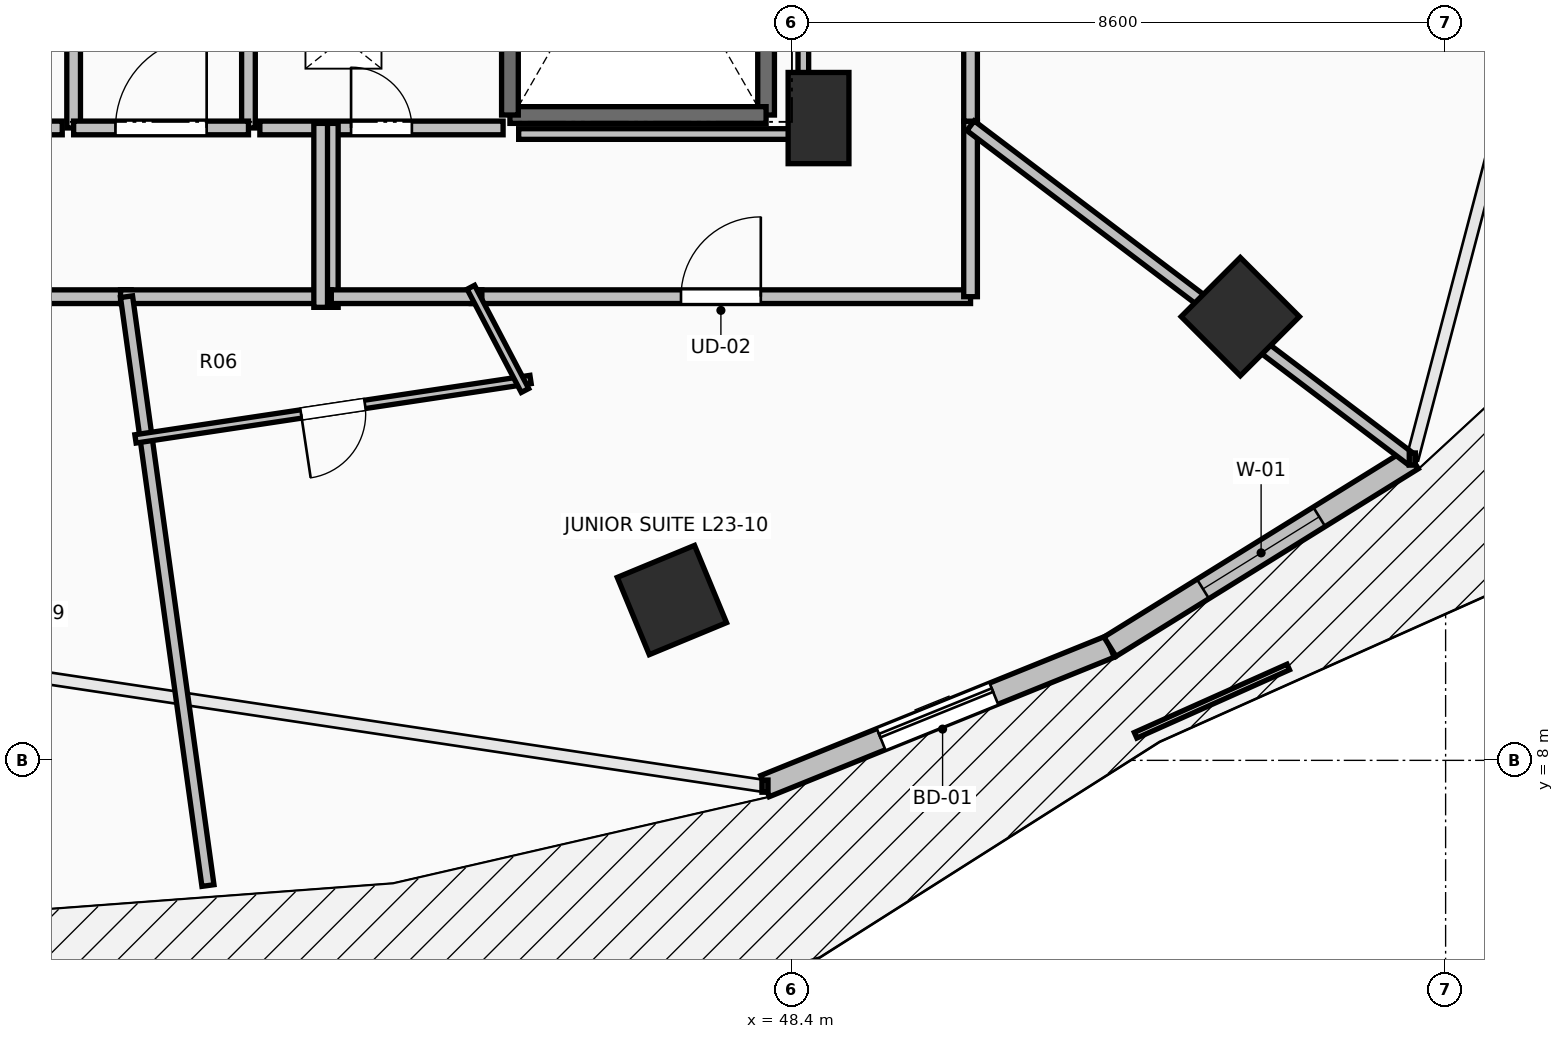
"""IFC4 building model, lengths in metres.
Left out: names, types, materials, properties, quantities, classifications, styles, units other than length and angle.
Written with IfcOpenShell. Run it as: python <this file> out.ifc"""

import sys

from ifc_helpers import new_model, si_unit, direction, frame, frame_2d, origin, origin_2d, place, context, subcontext, project, spatial, rectangle, extrude, element, fill, save


model = new_model("IFC4")
c1 = context("Model", 3, precision=1e-05, world=origin(), true_north=direction((0.0, 1.0)))
c2 = subcontext(c1, "Body", "Model", "MODEL_VIEW")
j1 = project(units=[si_unit("LENGTHUNIT", "METRE"), si_unit("PLANEANGLEUNIT", "RADIAN")], contexts=[c1])
p1 = place(None, origin())
s1 = spatial("IfcSite", under=j1, at=p1, CompositionType="ELEMENT")
p2 = place(p1, origin())
s2 = spatial("IfcBuilding", under=s1, at=p2, CompositionType="ELEMENT")
p3 = place(p2, frame((0.0, 0.0, 89.3)))
s3 = spatial("IfcBuildingStorey", under=s2, at=p3, CompositionType="ELEMENT", Elevation=89.3)
for number, where, z_axis, x_axis in (
    (1, (46.821, 10.109, 0.0), (0.0, 0.0, 1.0), (0.383, -0.924, 0.0)),
    (2, (54.299, 13.838, 0.0), (0.0, 0.0, 1.0), (0.707, -0.707, 0.0)),
):
    element("IfcColumn", number, at=place(p3, frame(where, z_axis=z_axis, x_axis=x_axis)), inside=s3, PredefinedType="COLUMN", context=c2, shape_type="SweptSolid", body=[
        extrude(rectangle(XDim=1.1, YDim=1.1, at=origin_2d()), origin(), (0.0, 0.0, 1.0), 3.5),
    ])
p4 = place(p3, frame((48.75, 16.45, 0.0), z_axis=(0.0, 0.0, 1.0), x_axis=(1.0, 0.0, 0.0)))
e3 = element("IfcColumn", 3, at=p4, inside=s3, PredefinedType="PILASTER", context=c2, shape_type="SweptSolid", body=[
    extrude(rectangle(XDim=0.8, YDim=1.2, at=origin_2d()), origin(), (0.0, 0.0, 1.0), 3.5),
])
p5 = place(p3, frame((48.045, 7.661, 0.0), z_axis=(0.0, 0.0, 1.0), x_axis=(0.927122233109, 0.374759075775, 0.0)))
e4 = element("IfcWall", 4, at=p5, inside=s3, PredefinedType="STANDARD", context=c2, shape_type="SweptSolid", body=[
    extrude(rectangle(XDim=4.895, YDim=0.3, at=frame_2d((2.448, 0.0))), origin(), (0.0, 0.0, 1.0), 3.24),
])
p6 = place(p5, frame((1.647, 0.0, 0.0)))
e5 = element("IfcOpeningElement", 5, at=p6, cuts=e4, PredefinedType="OPENING", context=c2, shape_type="SweptSolid", body=[
    extrude(rectangle(XDim=1.6, YDim=2.3, at=frame_2d((0.8, 1.15))), frame((0.0, 0.165, 0.0), z_axis=(0.0, -1.0, 0.0), x_axis=(1.0, 0.0, 0.0)), (0.0, 0.0, 1.0), 0.33),
])
p7 = place(p3, frame((52.584, 9.495, 0.0), z_axis=(0.0, 0.0, 1.0), x_axis=(0.849684479743, 0.527291461038, 0.0)))
e6 = element("IfcWall", 6, at=p7, inside=s3, PredefinedType="STANDARD", context=c2, shape_type="SweptSolid", body=[
    extrude(rectangle(XDim=4.681, YDim=0.3, at=frame_2d((2.341, 0.0))), origin(), (0.0, 0.0, 1.0), 3.24),
])
p8 = place(p7, frame((1.441, 0.0, 0.85)))
e7 = element("IfcOpeningElement", 7, at=p8, cuts=e6, PredefinedType="OPENING", context=c2, shape_type="SweptSolid", body=[
    extrude(rectangle(XDim=1.8, YDim=2.19, at=frame_2d((0.9, 1.095))), frame((0.0, 0.165, 0.0), z_axis=(0.0, -1.0, 0.0), x_axis=(1.0, 0.0, 0.0)), (0.0, 0.0, 1.0), 0.33),
])
p9 = place(p3, frame((48.06, 23.91, 0.0), z_axis=(0.0, 0.0, 1.0), x_axis=(0.0, -1.0, 0.0)))
e8 = element("IfcWall", 8, at=p9, inside=s3, PredefinedType="SOLIDWALL", context=c2, shape_type="SweptSolid", body=[
    extrude(rectangle(XDim=7.42, YDim=0.22, at=frame_2d((3.71, 0.0))), origin(), (0.0, 0.0, 1.0), 3.24),
])
p10 = place(p3, frame((48.06, 16.49, 0.0), z_axis=(0.0, 0.0, 1.0), x_axis=(-1.0, 0.0, 0.0)))
e9 = element("IfcWall", 9, at=p10, inside=s3, PredefinedType="SOLIDWALL", context=c2, shape_type="SweptSolid", body=[
    extrude(rectangle(XDim=3.37, YDim=0.22, at=frame_2d((1.685, 0.0))), origin(), (0.0, 0.0, 1.0), 3.24),
])
p11 = place(p3, frame((44.69, 16.49, 0.0), z_axis=(0.0, 0.0, 1.0), x_axis=(0.0, 1.0, 0.0)))
e10 = element("IfcWall", 10, at=p11, inside=s3, PredefinedType="SOLIDWALL", context=c2, shape_type="SweptSolid", body=[
    extrude(rectangle(XDim=7.42, YDim=0.22, at=frame_2d((3.71, 0.0))), origin(), (0.0, 0.0, 1.0), 3.24),
])
p12 = place(p3, frame((41.25, 16.32, 0.0), z_axis=(0.0, 0.0, 1.0), x_axis=(0.0, 1.0, 0.0)))
e11 = element("IfcWall", 11, at=p12, inside=s3, PredefinedType="PARTITIONING", context=c2, shape_type="SweptSolid", body=[
    extrude(rectangle(XDim=7.88, YDim=0.18, at=frame_2d((3.94, 0.0))), origin(), (0.0, 0.0, 1.0), 3.24),
])
p13 = place(p12, frame((3.54, 0.0, 0.0)))
e12 = element("IfcOpeningElement", 12, at=p13, cuts=e11, PredefinedType="OPENING", context=c2, shape_type="SweptSolid", body=[
    extrude(rectangle(XDim=0.8, YDim=2.05, at=frame_2d((0.4, 1.025))), frame((0.0, 0.105, 0.0), z_axis=(0.0, -1.0, 0.0), x_axis=(1.0, 0.0, 0.0)), (0.0, 0.0, 1.0), 0.21),
])
p14 = place(p3, frame((38.95, 21.755, 0.0), z_axis=(0.0, 0.0, 1.0), x_axis=(0.0, -1.0, 0.0)))
e13 = element("IfcWall", 13, at=p14, inside=s3, PredefinedType="PARTITIONING", context=c2, shape_type="SweptSolid", body=[
    extrude(rectangle(XDim=5.435, YDim=0.18, at=frame_2d((2.717, 0.0))), origin(), (0.0, 0.0, 1.0), 3.24),
])
p15 = place(p14, frame((2.292, 0.0, 0.0)))
e14 = element("IfcOpeningElement", 14, at=p15, cuts=e13, PredefinedType="OPENING", context=c2, shape_type="SweptSolid", body=[
    extrude(rectangle(XDim=0.85, YDim=2.1, at=frame_2d((0.425, 1.05))), frame((0.0, 0.105, 0.0), z_axis=(0.0, -1.0, 0.0), x_axis=(1.0, 0.0, 0.0)), (0.0, 0.0, 1.0), 0.21),
])
p16 = place(p3, frame((38.95, 16.32, 0.0), z_axis=(0.0, 0.0, 1.0), x_axis=(1.0, 0.0, 0.0)))
e15 = element("IfcWall", 15, at=p16, inside=s3, PredefinedType="PARTITIONING", context=c2, shape_type="SweptSolid", body=[
    extrude(rectangle(XDim=2.3, YDim=0.18, at=frame_2d((1.15, 0.0))), origin(), (0.0, 0.0, 1.0), 3.24),
])
p17 = place(p16, frame((0.55, 0.0, 0.0)))
e16 = element("IfcOpeningElement", 16, at=p17, cuts=e15, PredefinedType="OPENING", context=c2, shape_type="SweptSolid", body=[
    extrude(rectangle(XDim=1.2, YDim=2.15, at=frame_2d((0.6, 1.075))), frame((0.0, 0.105, 0.0), z_axis=(0.0, -1.0, 0.0), x_axis=(1.0, 0.0, 0.0)), (0.0, 0.0, 1.0), 0.21),
])
p18 = place(p3, frame((41.4, 16.32, 0.0), z_axis=(0.0, 0.0, 1.0), x_axis=(1.0, 0.0, 0.0)))
e17 = element("IfcWall", 17, at=p18, inside=s3, PredefinedType="PARTITIONING", context=c2, shape_type="SweptSolid", body=[
    extrude(rectangle(XDim=3.2, YDim=0.18, at=frame_2d((1.6, 0.0))), origin(), (0.0, 0.0, 1.0), 3.24),
])
p19 = place(p18, frame((1.2, 0.0, 0.0)))
e18 = element("IfcOpeningElement", 18, at=p19, cuts=e17, PredefinedType="OPENING", context=c2, shape_type="SweptSolid", body=[
    extrude(rectangle(XDim=0.8, YDim=2.05, at=frame_2d((0.4, 1.025))), frame((0.0, 0.105, 0.0), z_axis=(0.0, -1.0, 0.0), x_axis=(1.0, 0.0, 0.0)), (0.0, 0.0, 1.0), 0.21),
])
p20 = place(p3, frame((35.2, 16.32, 0.0), z_axis=(0.0, 0.0, 1.0), x_axis=(1.0, 0.0, 0.0)))
e19 = element("IfcWall", 19, at=p20, inside=s3, PredefinedType="PARTITIONING", context=c2, shape_type="SweptSolid", body=[
    extrude(rectangle(XDim=3.6, YDim=0.18, at=frame_2d((1.8, 0.0))), origin(), (0.0, 0.0, 1.0), 3.24),
])
p21 = place(p20, frame((1.375, 0.0, 0.0)))
e20 = element("IfcOpeningElement", 20, at=p21, cuts=e19, PredefinedType="OPENING", context=c2, shape_type="SweptSolid", body=[
    extrude(rectangle(XDim=0.85, YDim=2.1, at=frame_2d((0.425, 1.05))), frame((0.0, 0.105, 0.0), z_axis=(0.0, -1.0, 0.0), x_axis=(1.0, 0.0, 0.0)), (0.0, 0.0, 1.0), 0.21),
])
p22 = place(p3, frame((36.068, 14.1, 0.0), z_axis=(0.0, 0.0, 1.0), x_axis=(1.0, 0.0, 0.0)))
e21 = element("IfcWall", 21, at=p22, inside=s3, PredefinedType="PARTITIONING", context=c2, shape_type="SweptSolid", body=[
    extrude(rectangle(XDim=3.639, YDim=0.18, at=frame_2d((1.819, 0.0))), origin(), (0.0, 0.0, 1.0), 2.972),
])
p23 = place(p22, frame((1.32, 0.0, 0.0)))
e22 = element("IfcOpeningElement", 22, at=p23, cuts=e21, PredefinedType="OPENING", context=c2, shape_type="SweptSolid", body=[
    extrude(rectangle(XDim=1.0, YDim=2.15, at=frame_2d((0.5, 1.075))), frame((0.0, 0.105, 0.0), z_axis=(0.0, -1.0, 0.0), x_axis=(1.0, 0.0, 0.0)), (0.0, 0.0, 1.0), 0.21),
])
p24 = place(p3, frame((44.181, 14.1, 0.0), z_axis=(0.0, 0.0, 1.0), x_axis=(1.0, 0.0, 0.0)))
e23 = element("IfcWall", 23, at=p24, inside=s3, PredefinedType="PARTITIONING", context=c2, shape_type="SweptSolid", body=[
    extrude(rectangle(XDim=6.569, YDim=0.18, at=frame_2d((3.285, 0.0))), origin(), (0.0, 0.0, 1.0), 2.432),
])
p25 = place(p24, frame((2.76, 0.0, 0.0)))
e24 = element("IfcOpeningElement", 24, at=p25, cuts=e23, PredefinedType="OPENING", context=c2, shape_type="SweptSolid", body=[
    extrude(rectangle(XDim=1.05, YDim=2.2, at=frame_2d((0.525, 1.1))), frame((0.0, 0.105, 0.0), z_axis=(0.0, -1.0, 0.0), x_axis=(1.0, 0.0, 0.0)), (0.0, 0.0, 1.0), 0.21),
])
p26 = place(p3, frame((50.75, 14.1, 0.0), z_axis=(0.0, 0.0, 1.0), x_axis=(0.0, 1.0, 0.0)))
e25 = element("IfcWall", 25, at=p26, inside=s3, PredefinedType="PARTITIONING", context=c2, shape_type="SweptSolid", body=[
    extrude(rectangle(XDim=2.309, YDim=0.18, at=frame_2d((1.154, 0.0))), origin(), (0.0, 0.0, 1.0), 2.432),
])
p27 = place(p3, frame((42.34, 16.38, 0.0), z_axis=(0.0, 0.0, 1.0), x_axis=(0.0, -1.0, 0.0)))
e26 = element("IfcWall", 26, at=p27, inside=s3, PredefinedType="PARTITIONING", context=c2, shape_type="SweptSolid", body=[
    extrude(rectangle(XDim=2.42, YDim=0.18, at=frame_2d((1.21, 0.0))), origin(), (0.0, 0.0, 1.0), 2.972),
])
p28 = place(p3, frame((42.2, 14.1, 0.0), z_axis=(0.0, 0.0, 1.0), x_axis=(1.0, 0.0, 0.0)))
e27 = element("IfcWall", 27, at=p28, inside=s3, PredefinedType="PARTITIONING", context=c2, shape_type="SweptSolid", body=[
    extrude(rectangle(XDim=2.121, YDim=0.18, at=frame_2d((1.061, 0.0))), origin(), (0.0, 0.0, 1.0), 2.972),
])
p29 = place(p3, frame((39.567, 14.1, 0.0), z_axis=(0.0, 0.0, 1.0), x_axis=(1.0, 0.0, 0.0)))
e28 = element("IfcWall", 28, at=p29, inside=s3, PredefinedType="PARTITIONING", context=c2, shape_type="SweptSolid", body=[
    extrude(rectangle(XDim=2.773, YDim=0.18, at=frame_2d((1.387, 0.0))), origin(), (0.0, 0.0, 1.0), 2.972),
])
p30 = place(p3, frame((42.2, 13.96, 0.0), z_axis=(0.0, 0.0, 1.0), x_axis=(0.0, 1.0, 0.0)))
e29 = element("IfcWall", 29, at=p30, inside=s3, PredefinedType="PARTITIONING", context=c2, shape_type="SweptSolid", body=[
    extrude(rectangle(XDim=2.42, YDim=0.18, at=frame_2d((1.21, 0.0))), origin(), (0.0, 0.0, 1.0), 2.972),
])
p31 = place(p3, frame((50.75, 16.409, 0.0), z_axis=(0.0, 0.0, 1.0), x_axis=(0.0, 1.0, 0.0)))
e30 = element("IfcWall", 30, at=p31, inside=s3, PredefinedType="PARTITIONING", context=c2, shape_type="SweptSolid", body=[
    extrude(rectangle(XDim=11.155, YDim=0.18, at=frame_2d((5.578, 0.0))), origin(), (0.0, 0.0, 1.0), 2.432),
])
p32 = place(p31, frame((5.077, 0.0, 0.0)))
e31 = element("IfcOpeningElement", 31, at=p32, cuts=e30, PredefinedType="OPENING", context=c2, shape_type="SweptSolid", body=[
    extrude(rectangle(XDim=1.0, YDim=2.15, at=frame_2d((0.5, 1.075))), frame((0.0, 0.105, 0.0), z_axis=(0.0, -1.0, 0.0), x_axis=(1.0, 0.0, 0.0)), (0.0, 0.0, 1.0), 0.21),
])
p33 = place(p3, frame((40.717, 6.353, 0.0), z_axis=(0.0, 0.0, 1.0), x_axis=(-0.136949014068, 0.990578097651, 0.0)))
e32 = element("IfcWall", 32, at=p33, inside=s3, PredefinedType="PARTITIONING", context=c2, shape_type="SweptSolid", body=[
    extrude(rectangle(XDim=7.821, YDim=0.16, at=frame_2d((3.91, 0.0))), origin(), (0.0, 0.0, 1.0), 2.432),
])
p34 = place(p3, frame((44.961, 13.011, 0.0), z_axis=(0.0, 0.0, 1.0), x_axis=(-0.98888518965, -0.148681141008, 0.0)))
e33 = element("IfcWall", 33, at=p34, inside=s3, PredefinedType="PARTITIONING", context=c2, shape_type="SweptSolid", body=[
    extrude(rectangle(XDim=5.256, YDim=0.11, at=frame_2d((2.628, 0.0))), origin(), (0.0, 0.0, 1.0), 2.432),
])
p35 = place(p34, frame((2.203, 0.0, 0.0)))
e34 = element("IfcOpeningElement", 34, at=p35, cuts=e33, PredefinedType="OPENING", context=c2, shape_type="SweptSolid", body=[
    extrude(rectangle(XDim=0.85, YDim=2.1, at=frame_2d((0.425, 1.05))), frame((0.0, 0.07, 0.0), z_axis=(0.0, -1.0, 0.0), x_axis=(1.0, 0.0, 0.0)), (0.0, 0.0, 1.0), 0.14),
])
p36 = place(p3, frame((44.176, 14.224, 0.0), z_axis=(0.0, 0.0, 1.0), x_axis=(0.464262791375, -0.885697499457, 0.0)))
e35 = element("IfcWall", 35, at=p36, inside=s3, PredefinedType="PARTITIONING", context=c2, shape_type="SweptSolid", body=[
    extrude(rectangle(XDim=1.533, YDim=0.11, at=frame_2d((0.767, 0.0))), origin(), (0.0, 0.0, 1.0), 2.432),
])
p37 = place(p3, frame((56.548, 11.96, 0.0), z_axis=(0.0, 0.0, 1.0), x_axis=(-0.797312940684, 0.603566131105, 0.0)))
e36 = element("IfcWall", 36, at=p37, inside=s3, PredefinedType="PARTITIONING", context=c2, shape_type="SweptSolid", body=[
    extrude(rectangle(XDim=7.272, YDim=0.16, at=frame_2d((3.636, 0.0))), origin(), (0.0, 0.0, 1.0), 2.432),
])
p38 = place(p3, frame((48.55, 23.754, 0.0), z_axis=(0.0, 0.0, 1.0), x_axis=(0.0, -1.0, 0.0)))
e37 = element("IfcWall", 37, at=p38, inside=s3, PredefinedType="PARTITIONING", context=c2, shape_type="SweptSolid", body=[
    extrude(rectangle(XDim=7.514, YDim=0.14, at=frame_2d((3.757, 0.0))), origin(), (0.0, 0.0, 1.0), 2.432),
])
p39 = place(p3, frame((48.55, 16.24, 0.0), z_axis=(0.0, 0.0, 1.0), x_axis=(-1.0, 0.0, 0.0)))
e38 = element("IfcWall", 38, at=p39, inside=s3, PredefinedType="PARTITIONING", context=c2, shape_type="SweptSolid", body=[
    extrude(rectangle(XDim=3.745, YDim=0.14, at=frame_2d((1.873, 0.0))), origin(), (0.0, 0.0, 1.0), 2.432),
])
p40 = place(p6, origin())
e39 = element("IfcDoor", 39, at=p40, inside=s3, OperationType="SLIDING_TO_LEFT", PredefinedType="DOOR", context=c2, shape_type="SweptSolid", body=[
    extrude(rectangle(XDim=1.6, YDim=2.3, at=frame_2d((0.8, 1.15))), frame((0.0, 0.025, 0.0), z_axis=(0.0, -1.0, 0.0), x_axis=(1.0, 0.0, 0.0)), (0.0, 0.0, 1.0), 0.05),
])
fill(e5, e39)
p41 = place(p8, origin())
e40 = element("IfcWindow", 40, at=p41, inside=s3, PartitioningType="SINGLE_PANEL", PredefinedType="WINDOW", context=c2, shape_type="SweptSolid", body=[
    extrude(rectangle(XDim=1.8, YDim=2.19, at=frame_2d((0.9, 1.095))), frame((0.0, 0.03, 0.0), z_axis=(0.0, -1.0, 0.0), x_axis=(1.0, 0.0, 0.0)), (0.0, 0.0, 1.0), 0.06),
])
fill(e7, e40)
p42 = place(p17, origin())
e41 = element("IfcDoor", 41, at=p42, inside=s3, OperationType="SINGLE_SWING_RIGHT", PredefinedType="DOOR", context=c2, shape_type="SweptSolid", body=[
    extrude(rectangle(XDim=1.2, YDim=2.15, at=frame_2d((0.6, 1.075))), frame((0.0, 0.025, 0.0), z_axis=(0.0, -1.0, 0.0), x_axis=(1.0, 0.0, 0.0)), (0.0, 0.0, 1.0), 0.05),
])
fill(e16, e41)
p43 = place(p19, origin())
e42 = element("IfcDoor", 42, at=p43, inside=s3, OperationType="SINGLE_SWING_LEFT", PredefinedType="DOOR", context=c2, shape_type="SweptSolid", body=[
    extrude(rectangle(XDim=0.8, YDim=2.05, at=frame_2d((0.4, 1.025))), frame((0.0, 0.025, 0.0), z_axis=(0.0, -1.0, 0.0), x_axis=(1.0, 0.0, 0.0)), (0.0, 0.0, 1.0), 0.05),
])
fill(e18, e42)
p44 = place(p25, origin())
e43 = element("IfcDoor", 43, at=p44, inside=s3, OperationType="SINGLE_SWING_RIGHT", PredefinedType="DOOR", context=c2, shape_type="SweptSolid", body=[
    extrude(rectangle(XDim=1.05, YDim=2.2, at=frame_2d((0.525, 1.1))), frame((0.0, 0.025, 0.0), z_axis=(0.0, -1.0, 0.0), x_axis=(1.0, 0.0, 0.0)), (0.0, 0.0, 1.0), 0.05),
])
fill(e24, e43)
p45 = place(p35, origin())
e44 = element("IfcDoor", 44, at=p45, inside=s3, OperationType="SINGLE_SWING_RIGHT", PredefinedType="DOOR", context=c2, shape_type="SweptSolid", body=[
    extrude(rectangle(XDim=0.85, YDim=2.1, at=frame_2d((0.425, 1.05))), frame((0.0, 0.025, 0.0), z_axis=(0.0, -1.0, 0.0), x_axis=(1.0, 0.0, 0.0)), (0.0, 0.0, 1.0), 0.05),
])
fill(e34, e44)
save(model, sys.argv[1])
